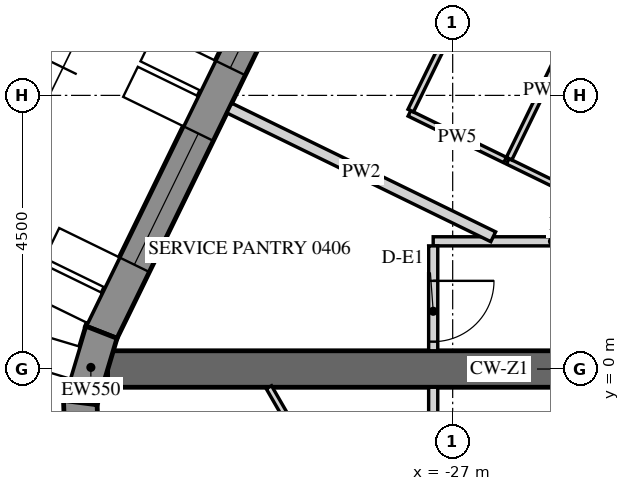
"""IFC4 building model, lengths in metres.
Left out: names, types, materials, properties, quantities, classifications, styles, units other than length and angle.
Written with IfcOpenShell. Run it as: python <this file> out.ifc"""

import sys

from ifc_helpers import new_model, si_unit, direction, frame, frame_2d, origin, place, context, subcontext, project, spatial, polyline, rectangle, outline, extrude, element, fill, save


model = new_model("IFC4")
c1 = context("Model", 3, precision=1e-05, world=origin(), true_north=direction((0.0, 1.0)))
c2 = subcontext(c1, "Body", "Model", "MODEL_VIEW")
j1 = project(units=[si_unit("LENGTHUNIT", "METRE"), si_unit("PLANEANGLEUNIT", "RADIAN")], contexts=[c1])
p1 = place(None, origin())
s1 = spatial("IfcSite", under=j1, at=p1, CompositionType="ELEMENT")
p2 = place(p1, origin())
s2 = spatial("IfcBuilding", under=s1, at=p2, CompositionType="ELEMENT")
p3 = place(p2, frame((0.0, 0.0, 68.7)))
s3 = spatial("IfcBuildingStorey", under=s2, at=p3, CompositionType="ELEMENT", Elevation=68.7)
p4 = place(p3, frame((-19.595, 27.633, -0.15), z_axis=(0.0, 0.0, 1.0), x_axis=(-0.438368285794, -0.898795441694, 0.0)))
e1 = element("IfcWall", 1, at=p4, inside=s3, PredefinedType="SOLIDWALL", context=c2, shape_type="SweptSolid", body=[
    extrude(outline(polyline([(-0.026, -0.275), (30.093, -0.275), (30.048, 0.275), (0.026, 0.275), (-0.026, -0.275)])), origin(), (0.0, 0.0, 1.0), 3.9),
])
p5 = place(p4, frame((1.236, 0.0, 1.05)))
e2 = element("IfcOpeningElement", 2, at=p5, cuts=e1, PredefinedType="OPENING", context=c2, shape_type="SweptSolid", body=[
    extrude(rectangle(XDim=2.4, YDim=2.4, at=frame_2d((1.2, 1.2))), frame((0.0, 0.285, 0.0), z_axis=(0.0, -1.0, 0.0), x_axis=(1.0, 0.0, 0.0)), (0.0, 0.0, 1.0), 0.57),
])
p6 = place(p4, frame((4.835, 0.0, 1.05)))
e3 = element("IfcOpeningElement", 3, at=p6, cuts=e1, PredefinedType="OPENING", context=c2, shape_type="SweptSolid", body=[
    extrude(rectangle(XDim=2.4, YDim=2.4, at=frame_2d((1.2, 1.2))), frame((0.0, 0.285, 0.0), z_axis=(0.0, -1.0, 0.0), x_axis=(1.0, 0.0, 0.0)), (0.0, 0.0, 1.0), 0.57),
])
p7 = place(p4, frame((8.436, 0.0, 1.05)))
e4 = element("IfcOpeningElement", 4, at=p7, cuts=e1, PredefinedType="OPENING", context=c2, shape_type="SweptSolid", body=[
    extrude(rectangle(XDim=2.4, YDim=2.4, at=frame_2d((1.2, 1.2))), frame((0.0, 0.285, 0.0), z_axis=(0.0, -1.0, 0.0), x_axis=(1.0, 0.0, 0.0)), (0.0, 0.0, 1.0), 0.57),
])
p8 = place(p4, frame((12.035, 0.0, 1.05)))
e5 = element("IfcOpeningElement", 5, at=p8, cuts=e1, PredefinedType="OPENING", context=c2, shape_type="SweptSolid", body=[
    extrude(rectangle(XDim=2.4, YDim=2.4, at=frame_2d((1.2, 1.2))), frame((0.0, 0.285, 0.0), z_axis=(0.0, -1.0, 0.0), x_axis=(1.0, 0.0, 0.0)), (0.0, 0.0, 1.0), 0.57),
])
p9 = place(p4, frame((15.635, 0.0, 1.05)))
e6 = element("IfcOpeningElement", 6, at=p9, cuts=e1, PredefinedType="OPENING", context=c2, shape_type="SweptSolid", body=[
    extrude(rectangle(XDim=2.4, YDim=2.4, at=frame_2d((1.2, 1.2))), frame((0.0, 0.285, 0.0), z_axis=(0.0, -1.0, 0.0), x_axis=(1.0, 0.0, 0.0)), (0.0, 0.0, 1.0), 0.57),
])
p10 = place(p4, frame((19.236, 0.0, 1.05)))
e7 = element("IfcOpeningElement", 7, at=p10, cuts=e1, PredefinedType="OPENING", context=c2, shape_type="SweptSolid", body=[
    extrude(rectangle(XDim=2.4, YDim=2.4, at=frame_2d((1.2, 1.2))), frame((0.0, 0.285, 0.0), z_axis=(0.0, -1.0, 0.0), x_axis=(1.0, 0.0, 0.0)), (0.0, 0.0, 1.0), 0.57),
])
p11 = place(p4, frame((22.835, 0.0, 1.05)))
e8 = element("IfcOpeningElement", 8, at=p11, cuts=e1, PredefinedType="OPENING", context=c2, shape_type="SweptSolid", body=[
    extrude(rectangle(XDim=2.4, YDim=2.4, at=frame_2d((1.2, 1.2))), frame((0.0, 0.285, 0.0), z_axis=(0.0, -1.0, 0.0), x_axis=(1.0, 0.0, 0.0)), (0.0, 0.0, 1.0), 0.57),
])
p12 = place(p4, frame((26.436, 0.0, 1.05)))
e9 = element("IfcOpeningElement", 9, at=p12, cuts=e1, PredefinedType="OPENING", context=c2, shape_type="SweptSolid", body=[
    extrude(rectangle(XDim=2.4, YDim=2.4, at=frame_2d((1.2, 1.2))), frame((0.0, 0.285, 0.0), z_axis=(0.0, -1.0, 0.0), x_axis=(1.0, 0.0, 0.0)), (0.0, 0.0, 1.0), 0.57),
])
p13 = place(p3, frame((-32.777, 0.605, -0.15), z_axis=(0.0, 0.0, 1.0), x_axis=(-0.286921497463, -0.957954098219, 0.0)))
e10 = element("IfcWall", 10, at=p13, inside=s3, PredefinedType="SOLIDWALL", context=c2, shape_type="SweptSolid", body=[
    extrude(outline(polyline([(-0.022, -0.275), (1.253, -0.275), (1.163, 0.275), (0.022, 0.275), (-0.022, -0.275)])), origin(), (0.0, 0.0, 1.0), 3.9),
])
p14 = place(p3, frame((-33.124, -0.552, -0.15), z_axis=(0.0, 0.0, 1.0), x_axis=(0.03495638276, -0.999388838893, 0.0)))
e11 = element("IfcWall", 11, at=p14, inside=s3, PredefinedType="SOLIDWALL", context=c2, shape_type="SweptSolid", body=[
    extrude(outline(polyline([(-0.045, -0.275), (1.253, -0.275), (1.163, 0.275), (0.045, 0.275), (-0.045, -0.275)])), origin(), (0.0, 0.0, 1.0), 3.9),
])
p15 = place(p3, frame((-16.166, 0.0, -0.15), z_axis=(0.0, 0.0, 1.0), x_axis=(-1.0, 0.0, 0.0)))
e12 = element("IfcWall", 12, at=p15, inside=s3, PredefinedType="SHEAR", context=c2, shape_type="SweptSolid", body=[
    extrude(rectangle(XDim=16.509, YDim=0.6, at=frame_2d((8.254, 0.0))), origin(), (0.0, 0.0, 1.0), 3.9),
])
p16 = place(p15, frame((7.354, 0.0, 0.15)))
e13 = element("IfcOpeningElement", 13, at=p16, cuts=e12, PredefinedType="OPENING", context=c2, shape_type="SweptSolid", body=[
    extrude(rectangle(XDim=1.8, YDim=2.4, at=frame_2d((0.9, 1.2))), frame((0.0, 0.31, 0.0), z_axis=(0.0, -1.0, 0.0), x_axis=(1.0, 0.0, 0.0)), (0.0, 0.0, 1.0), 0.62),
])
p17 = place(p3, frame((-23.397, 2.1, 0.0), z_axis=(0.0, 0.0, 1.0), x_axis=(-1.0, 0.0, 0.0)))
e14 = element("IfcWall", 14, at=p17, inside=s3, PredefinedType="PARTITIONING", context=c2, shape_type="SweptSolid", body=[
    extrude(rectangle(XDim=3.923, YDim=0.15, at=frame_2d((1.961, 0.0))), origin(), (0.0, 0.0, 1.0), 2.988),
])
p18 = place(p3, frame((-27.32, 2.025, 0.0), z_axis=(0.0, 0.0, 1.0), x_axis=(0.0, -1.0, 0.0)))
e15 = element("IfcWall", 15, at=p18, inside=s3, PredefinedType="PARTITIONING", context=c2, shape_type="SweptSolid", body=[
    extrude(rectangle(XDim=1.725, YDim=0.15, at=frame_2d((0.862, 0.0))), origin(), (0.0, 0.0, 1.0), 2.988),
])
p19 = place(p18, frame((0.575, 0.0, 0.0)))
e16 = element("IfcOpeningElement", 16, at=p19, cuts=e15, PredefinedType="OPENING", context=c2, shape_type="SweptSolid", body=[
    extrude(rectangle(XDim=1.0, YDim=2.1, at=frame_2d((0.5, 1.05))), frame((0.0, 0.085, 0.0), z_axis=(0.0, -1.0, 0.0), x_axis=(1.0, 0.0, 0.0)), (0.0, 0.0, 1.0), 0.17),
])
p20 = place(p3, frame((-27.32, -0.3, 0.0), z_axis=(0.0, 0.0, 1.0), x_axis=(0.0, -1.0, 0.0)))
e17 = element("IfcWall", 17, at=p20, inside=s3, PredefinedType="PARTITIONING", context=c2, shape_type="SweptSolid", body=[
    extrude(rectangle(XDim=1.8, YDim=0.15, at=frame_2d((0.9, 0.0))), origin(), (0.0, 0.0, 1.0), 2.988),
])
p21 = place(p3, frame((-23.551, 2.175, 0.0), z_axis=(0.0, 0.0, 1.0), x_axis=(-0.89881903386, 0.438319910991, 0.0)))
e18 = element("IfcWall", 18, at=p21, inside=s3, PredefinedType="PARTITIONING", context=c2, shape_type="SweptSolid", body=[
    extrude(rectangle(XDim=2.829, YDim=0.1, at=frame_2d((1.415, 0.0))), origin(), (0.0, 0.0, 1.0), 2.988),
])
p22 = place(p3, frame((-26.139, 3.437, 0.0), z_axis=(0.0, 0.0, 1.0), x_axis=(-0.89881938742, 0.438319185981, 0.0)))
e19 = element("IfcWall", 19, at=p22, inside=s3, PredefinedType="PARTITIONING", context=c2, shape_type="SweptSolid", body=[
    extrude(rectangle(XDim=1.75, YDim=0.1, at=frame_2d((0.875, 0.0))), origin(), (0.0, 0.0, 1.0), 2.988),
])
p23 = place(p3, frame((-27.69, 4.249, 0.0), z_axis=(0.0, 0.0, 1.0), x_axis=(0.438384020656, 0.898787767181, 0.0)))
e20 = element("IfcWall", 20, at=p23, inside=s3, PredefinedType="PARTITIONING", context=c2, shape_type="SweptSolid", body=[
    extrude(rectangle(XDim=2.55, YDim=0.1, at=frame_2d((1.275, 0.0))), origin(), (0.0, 0.0, 1.0), 2.988),
])
p24 = place(p3, frame((-30.673, 4.292, 0.0), z_axis=(0.0, 0.0, 1.0), x_axis=(0.898812662672, -0.438332975512, 0.0)))
e21 = element("IfcWall", 21, at=p24, inside=s3, PredefinedType="PARTITIONING", context=c2, shape_type="SweptSolid", body=[
    extrude(rectangle(XDim=4.828, YDim=0.18, at=frame_2d((2.414, 0.0))), origin(), (0.0, 0.0, 1.0), 2.988),
])
p25 = place(p3, frame((-24.976, 5.707, 0.0), z_axis=(0.0, 0.0, 1.0), x_axis=(-0.438363988158, -0.898797537761, 0.0)))
e22 = element("IfcWall", 22, at=p25, inside=s3, PredefinedType="PARTITIONING", context=c2, shape_type="SweptSolid", body=[
    extrude(rectangle(XDim=2.5, YDim=0.1, at=frame_2d((1.25, 0.0))), origin(), (0.0, 0.0, 1.0), 2.988),
])
p26 = place(p3, frame((-30.022, -0.3, 0.0), z_axis=(0.0, 0.0, 1.0), x_axis=(0.499995798296, -0.866027829626, 0.0)))
e23 = element("IfcWall", 23, at=p26, inside=s3, PredefinedType="PARTITIONING", context=c2, shape_type="SweptSolid", body=[
    extrude(rectangle(XDim=8.762, YDim=0.1, at=frame_2d((4.381, 0.0))), origin(), (0.0, 0.0, 1.0), 2.988),
])
p27 = place(p26, frame((4.712, 0.0, 0.0)))
e24 = element("IfcOpeningElement", 24, at=p27, cuts=e23, PredefinedType="OPENING", context=c2, shape_type="SweptSolid", body=[
    extrude(rectangle(XDim=0.9, YDim=2.1, at=frame_2d((0.45, 1.05))), frame((0.0, 0.06, 0.0), z_axis=(0.0, -1.0, 0.0), x_axis=(1.0, 0.0, 0.0)), (0.0, 0.0, 1.0), 0.12),
])
p28 = place(p11, frame((0.0, 0.205, 0.0)))
e25 = element("IfcWindow", 25, at=p28, inside=s3, PartitioningType="DOUBLE_PANEL_VERTICAL", PredefinedType="WINDOW", context=c2, shape_type="SweptSolid", body=[
    extrude(rectangle(XDim=2.4, YDim=2.4, at=frame_2d((1.2, 1.2))), frame((0.0, 0.03, 0.0), z_axis=(0.0, -1.0, 0.0), x_axis=(1.0, 0.0, 0.0)), (0.0, 0.0, 1.0), 0.06),
])
fill(e8, e25)
p29 = place(p12, frame((0.0, 0.205, 0.0)))
e26 = element("IfcWindow", 26, at=p29, inside=s3, PartitioningType="DOUBLE_PANEL_VERTICAL", PredefinedType="WINDOW", context=c2, shape_type="SweptSolid", body=[
    extrude(rectangle(XDim=2.4, YDim=2.4, at=frame_2d((1.2, 1.2))), frame((0.0, 0.03, 0.0), z_axis=(0.0, -1.0, 0.0), x_axis=(1.0, 0.0, 0.0)), (0.0, 0.0, 1.0), 0.06),
])
fill(e9, e26)
p30 = place(p19, origin())
e27 = element("IfcDoor", 27, at=p30, inside=s3, OperationType="SINGLE_SWING_LEFT", PredefinedType="DOOR", context=c2, shape_type="SweptSolid", body=[
    extrude(rectangle(XDim=1.0, YDim=2.1, at=frame_2d((0.5, 1.05))), frame((0.0, 0.025, 0.0), z_axis=(0.0, -1.0, 0.0), x_axis=(1.0, 0.0, 0.0)), (0.0, 0.0, 1.0), 0.05),
])
fill(e16, e27)
save(model, sys.argv[1])
